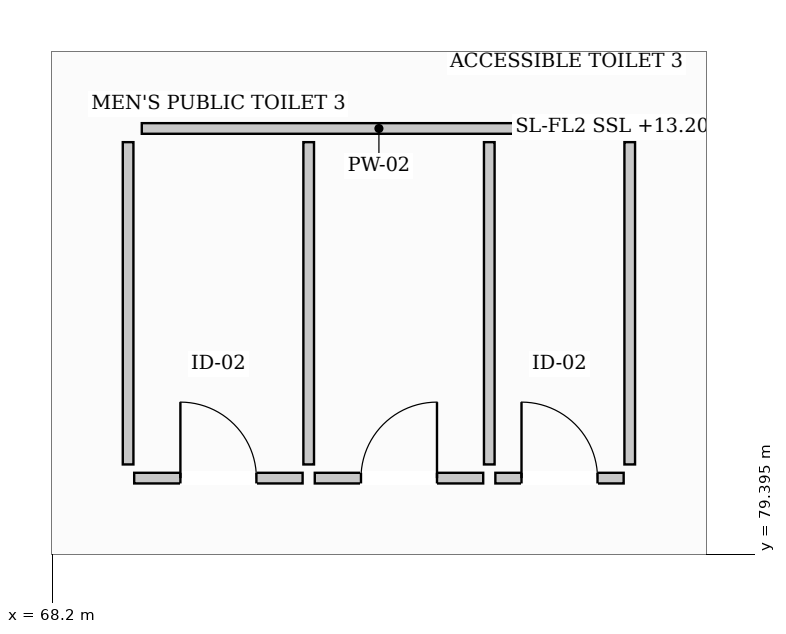
"""IFC4 building model, lengths in metres.
Left out: names, types, materials, properties, quantities, classifications, styles, units other than length and angle.
Written with IfcOpenShell. Run it as: python <this file> out.ifc"""

import sys

from ifc_helpers import new_model, si_unit, direction, frame, frame_2d, origin, place, context, subcontext, project, spatial, rectangle, extrude, element, fill, save


model = new_model("IFC4")
c1 = context("Model", 3, precision=1e-05, world=origin(), true_north=direction((0.0, 1.0)))
c2 = subcontext(c1, "Body", "Model", "MODEL_VIEW")
j1 = project(units=[si_unit("LENGTHUNIT", "METRE"), si_unit("PLANEANGLEUNIT", "RADIAN")], contexts=[c1])
p1 = place(None, origin())
s1 = spatial("IfcSite", under=j1, at=p1, CompositionType="ELEMENT")
p2 = place(p1, origin())
s2 = spatial("IfcBuilding", under=s1, at=p2, CompositionType="ELEMENT")
p3 = place(p2, frame((0.0, 0.0, 13.2)))
s3 = spatial("IfcBuildingStorey", under=s2, at=p3, CompositionType="ELEMENT", Elevation=13.2)
p4 = place(p3, frame((69.38, 85.0, 0.0), z_axis=(0.0, 0.0, 1.0), x_axis=(1.0, 0.0, 0.0)))
e1 = element("IfcWall", 1, at=p4, inside=s3, PredefinedType="PARTITIONING", context=c2, shape_type="SweptSolid", body=[
    extrude(rectangle(XDim=6.24, YDim=0.14, at=frame_2d((3.12, 0.0))), origin(), (0.0, 0.0, 1.0), 2.94),
])
for number, where, z_axis, x_axis in (
    (2, (69.2, 80.58, 0.0), (0.0, 0.0, 1.0), (0.0, 1.0, 0.0)),
    (3, (75.8, 80.58, 0.0), (0.0, 0.0, 1.0), (0.0, 1.0, 0.0)),
    (4, (71.576, 80.58, 0.0), (0.0, 0.0, 1.0), (0.0, 1.0, 0.0)),
    (5, (73.952, 80.58, 0.0), (0.0, 0.0, 1.0), (0.0, 1.0, 0.0)),
):
    element("IfcWall", number, at=place(p3, frame(where, z_axis=z_axis, x_axis=x_axis)), inside=s3, PredefinedType="PARTITIONING", context=c2, shape_type="SweptSolid", body=[
        extrude(rectangle(XDim=4.24, YDim=0.14, at=frame_2d((2.12, 0.0))), origin(), (0.0, 0.0, 1.0), 3.3),
    ])
p5 = place(p3, frame((69.28, 80.4, 0.0), z_axis=(0.0, 0.0, 1.0), x_axis=(1.0, 0.0, 0.0)))
e6 = element("IfcWall", 6, at=p5, inside=s3, PredefinedType="PARTITIONING", context=c2, shape_type="SweptSolid", body=[
    extrude(rectangle(XDim=2.216, YDim=0.14, at=frame_2d((1.108, 0.0))), origin(), (0.0, 0.0, 1.0), 3.3),
])
p6 = place(p5, frame((0.608, 0.0, 0.0)))
e7 = element("IfcOpeningElement", 7, at=p6, cuts=e6, PredefinedType="OPENING", context=c2, shape_type="SweptSolid", body=[
    extrude(rectangle(XDim=1.0, YDim=2.15, at=frame_2d((0.5, 1.075))), frame((0.0, 0.08, 0.0), z_axis=(0.0, -1.0, 0.0), x_axis=(1.0, 0.0, 0.0)), (0.0, 0.0, 1.0), 0.16),
])
p7 = place(p3, frame((71.656, 80.4, 0.0), z_axis=(0.0, 0.0, 1.0), x_axis=(1.0, 0.0, 0.0)))
e8 = element("IfcWall", 8, at=p7, inside=s3, PredefinedType="PARTITIONING", context=c2, shape_type="SweptSolid", body=[
    extrude(rectangle(XDim=2.216, YDim=0.14, at=frame_2d((1.108, 0.0))), origin(), (0.0, 0.0, 1.0), 2.94),
])
p8 = place(p7, frame((0.608, 0.0, 0.0)))
e9 = element("IfcOpeningElement", 9, at=p8, cuts=e8, PredefinedType="OPENING", context=c2, shape_type="SweptSolid", body=[
    extrude(rectangle(XDim=1.0, YDim=2.15, at=frame_2d((0.5, 1.075))), frame((0.0, 0.08, 0.0), z_axis=(0.0, -1.0, 0.0), x_axis=(1.0, 0.0, 0.0)), (0.0, 0.0, 1.0), 0.16),
])
p9 = place(p3, frame((74.032, 80.4, 0.0), z_axis=(0.0, 0.0, 1.0), x_axis=(1.0, 0.0, 0.0)))
e10 = element("IfcWall", 10, at=p9, inside=s3, PredefinedType="PARTITIONING", context=c2, shape_type="SweptSolid", body=[
    extrude(rectangle(XDim=1.688, YDim=0.14, at=frame_2d((0.844, 0.0))), origin(), (0.0, 0.0, 1.0), 3.3),
])
p10 = place(p9, frame((0.344, 0.0, 0.0)))
e11 = element("IfcOpeningElement", 11, at=p10, cuts=e10, PredefinedType="OPENING", context=c2, shape_type="SweptSolid", body=[
    extrude(rectangle(XDim=1.0, YDim=2.15, at=frame_2d((0.5, 1.075))), frame((0.0, 0.08, 0.0), z_axis=(0.0, -1.0, 0.0), x_axis=(1.0, 0.0, 0.0)), (0.0, 0.0, 1.0), 0.16),
])
p11 = place(p6, origin())
e12 = element("IfcDoor", 12, at=p11, inside=s3, OperationType="SINGLE_SWING_LEFT", PredefinedType="DOOR", context=c2, shape_type="SweptSolid", body=[
    extrude(rectangle(XDim=1.0, YDim=2.15, at=frame_2d((0.5, 1.075))), frame((0.0, 0.025, 0.0), z_axis=(0.0, -1.0, 0.0), x_axis=(1.0, 0.0, 0.0)), (0.0, 0.0, 1.0), 0.05),
])
fill(e7, e12)
p12 = place(p8, origin())
e13 = element("IfcDoor", 13, at=p12, inside=s3, OperationType="SINGLE_SWING_RIGHT", PredefinedType="DOOR", context=c2, shape_type="SweptSolid", body=[
    extrude(rectangle(XDim=1.0, YDim=2.15, at=frame_2d((0.5, 1.075))), frame((0.0, 0.025, 0.0), z_axis=(0.0, -1.0, 0.0), x_axis=(1.0, 0.0, 0.0)), (0.0, 0.0, 1.0), 0.05),
])
fill(e9, e13)
p13 = place(p10, origin())
e14 = element("IfcDoor", 14, at=p13, inside=s3, OperationType="SINGLE_SWING_LEFT", PredefinedType="DOOR", context=c2, shape_type="SweptSolid", body=[
    extrude(rectangle(XDim=1.0, YDim=2.15, at=frame_2d((0.5, 1.075))), frame((0.0, 0.025, 0.0), z_axis=(0.0, -1.0, 0.0), x_axis=(1.0, 0.0, 0.0)), (0.0, 0.0, 1.0), 0.05),
])
fill(e11, e14)
save(model, sys.argv[1])
